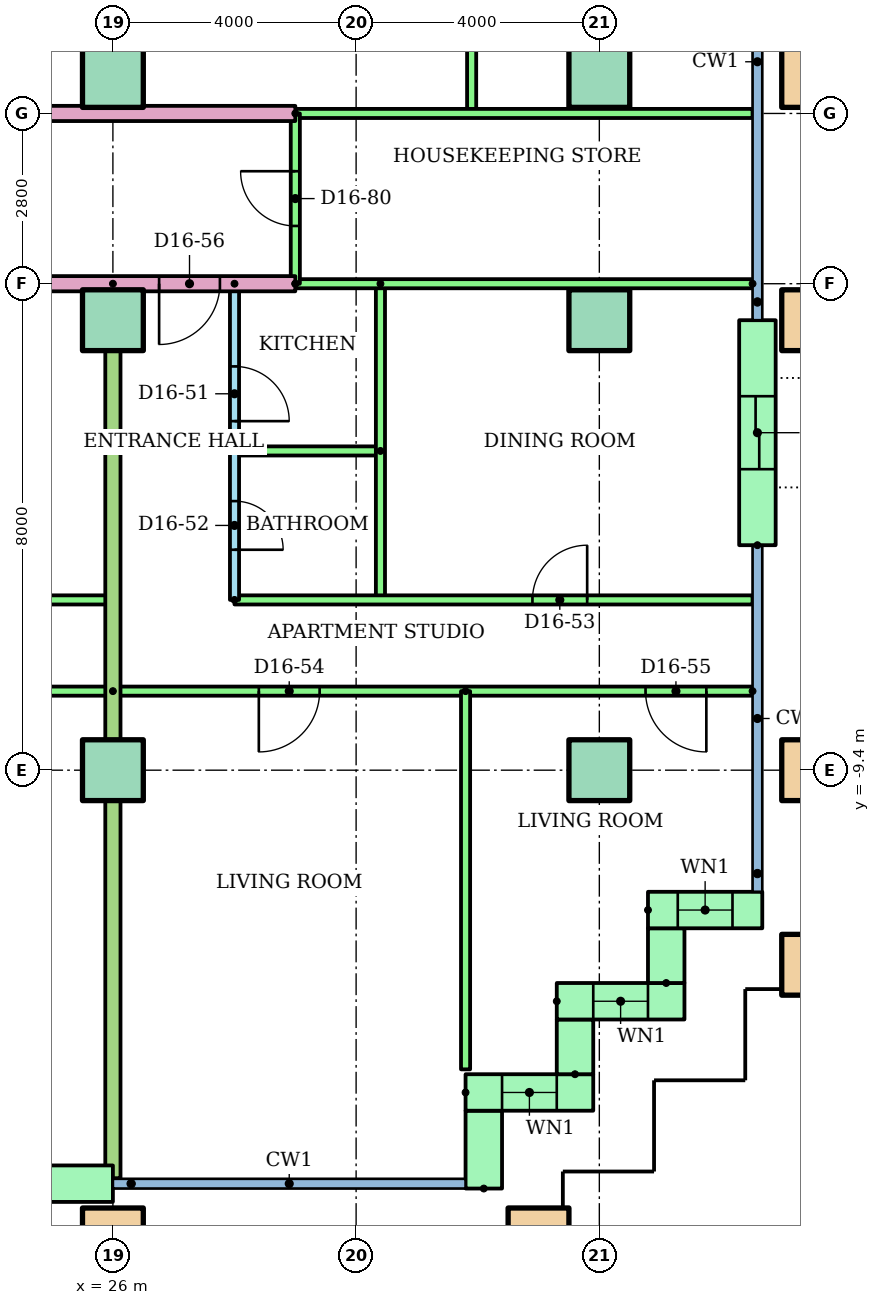
"""IFC4 building model, lengths in metres.
Left out: names, types, materials, properties, quantities, classifications, styles, units other than length and angle.
Written with IfcOpenShell. Run it as: python <this file> out.ifc"""

import sys

from ifc_helpers import new_model, si_unit, direction, frame, frame_2d, origin, origin_2d, place, context, subcontext, project, spatial, rectangle, hollow_rectangle, extrude, element, fill, save


model = new_model("IFC4")
c1 = context("Model", 3, precision=1e-05, world=origin(), true_north=direction((0.0, 1.0)))
c2 = subcontext(c1, "Body", "Model", "MODEL_VIEW")
j1 = project(units=[si_unit("LENGTHUNIT", "METRE"), si_unit("PLANEANGLEUNIT", "RADIAN")], contexts=[c1])
p1 = place(None, origin())
s1 = spatial("IfcSite", under=j1, at=p1, CompositionType="ELEMENT")
p2 = place(p1, origin())
s2 = spatial("IfcBuilding", under=s1, at=p2, CompositionType="ELEMENT")
p3 = place(p2, frame((0.0, 0.0, 60.8)))
s3 = spatial("IfcBuildingStorey", under=s2, at=p3, CompositionType="ELEMENT", Elevation=60.8)
for number, where in (
    (1, (26.0, -17.1, 0.0)),
    (2, (33.0, -17.1, 0.0)),
    (3, (37.5, -12.6, 0.0)),
):
    element("IfcColumn", number, at=place(p3, frame(where)), inside=s3, PredefinedType="COLUMN", context=c2, shape_type="SweptSolid", body=[
        extrude(hollow_rectangle(XDim=1.0, YDim=1.0, WallThickness=0.05, at=origin_2d()), origin(), (0.0, 0.0, 1.0), 3.2),
    ])
for number, where in (
    (4, (26.0, -9.4, 0.0)),
    (5, (34.0, -9.4, 0.0)),
):
    element("IfcColumn", number, at=place(p3, frame(where)), inside=s3, PredefinedType="COLUMN", context=c2, shape_type="SweptSolid", body=[
        extrude(rectangle(XDim=1.0, YDim=1.0, at=origin_2d()), origin(), (0.0, 0.0, 1.0), 3.2),
    ])
p4 = place(p3, frame((37.5, -9.4, 0.0)))
e6 = element("IfcColumn", 6, at=p4, inside=s3, PredefinedType="COLUMN", context=c2, shape_type="SweptSolid", body=[
    extrude(hollow_rectangle(XDim=1.0, YDim=1.0, WallThickness=0.05, at=origin_2d()), origin(), (0.0, 0.0, 1.0), 3.2),
])
for number, where in (
    (7, (26.0, -2.0, 0.0)),
    (8, (34.0, -2.0, 0.0)),
):
    element("IfcColumn", number, at=place(p3, frame(where)), inside=s3, PredefinedType="COLUMN", context=c2, shape_type="SweptSolid", body=[
        extrude(rectangle(XDim=1.0, YDim=1.0, at=origin_2d()), origin(), (0.0, 0.0, 1.0), 3.2),
    ])
p5 = place(p3, frame((37.5, -2.0, 0.0)))
e9 = element("IfcColumn", 9, at=p5, inside=s3, PredefinedType="COLUMN", context=c2, shape_type="SweptSolid", body=[
    extrude(hollow_rectangle(XDim=1.0, YDim=1.0, WallThickness=0.05, at=origin_2d()), origin(), (0.0, 0.0, 1.0), 3.2),
])
for number, where in (
    (10, (26.0, 2.0, 0.0)),
    (11, (34.0, 2.0, 0.0)),
):
    element("IfcColumn", number, at=place(p3, frame(where)), inside=s3, PredefinedType="COLUMN", context=c2, shape_type="SweptSolid", body=[
        extrude(rectangle(XDim=1.0, YDim=1.0, at=origin_2d()), origin(), (0.0, 0.0, 1.0), 3.2),
    ])
p6 = place(p3, frame((37.5, 2.0, 0.0)))
e12 = element("IfcColumn", 12, at=p6, inside=s3, PredefinedType="COLUMN", context=c2, shape_type="SweptSolid", body=[
    extrude(hollow_rectangle(XDim=1.0, YDim=1.0, WallThickness=0.05, at=origin_2d()), origin(), (0.0, 0.0, 1.0), 3.2),
])
p7 = place(p3, frame((22.0, -16.2, 0.0)))
e13 = element("IfcWall", 13, at=p7, inside=s3, PredefinedType="STANDARD", context=c2, shape_type="SweptSolid", body=[
    extrude(rectangle(XDim=4.0, YDim=0.6, at=frame_2d((2.0, 0.0))), origin(), (0.0, 0.0, 1.0), 2.8),
])
p8 = place(p7, frame((1.4, 0.0, 0.0)))
e14 = element("IfcOpeningElement", 14, at=p8, cuts=e13, PredefinedType="OPENING", context=c2, shape_type="SweptSolid", body=[
    extrude(rectangle(XDim=1.2, YDim=2.1, at=frame_2d((0.6, 1.05))), frame((0.0, 0.31, 0.0), z_axis=(0.0, -1.0, 0.0), x_axis=(1.0, 0.0, 0.0)), (0.0, 0.0, 1.0), 0.62),
])
p9 = place(p3, frame((32.1, -16.28, 0.0), z_axis=(0.0, 0.0, 1.0), x_axis=(0.0, 1.0, 0.0)))
e15 = element("IfcWall", 15, at=p9, inside=s3, PredefinedType="STANDARD", context=c2, shape_type="SweptSolid", body=[
    extrude(rectangle(XDim=1.28, YDim=0.6, at=frame_2d((0.64, 0.0))), origin(), (0.0, 0.0, 1.0), 2.8),
])
p10 = place(p3, frame((31.8, -14.7, 0.0)))
e16 = element("IfcWall", 16, at=p10, inside=s3, PredefinedType="STANDARD", context=c2, shape_type="SweptSolid", body=[
    extrude(rectangle(XDim=2.1, YDim=0.6, at=frame_2d((1.05, 0.0))), origin(), (0.0, 0.0, 1.0), 2.8),
])
p11 = place(p10, frame((0.6, 0.0, 0.9)))
e17 = element("IfcOpeningElement", 17, at=p11, cuts=e16, PredefinedType="OPENING", context=c2, shape_type="SweptSolid", body=[
    extrude(rectangle(XDim=0.9, YDim=1.5, at=frame_2d((0.45, 0.75))), frame((0.0, 0.31, 0.0), z_axis=(0.0, -1.0, 0.0), x_axis=(1.0, 0.0, 0.0)), (0.0, 0.0, 1.0), 0.62),
])
p12 = place(p3, frame((33.6, -14.4, 0.0), z_axis=(0.0, 0.0, 1.0), x_axis=(0.0, 1.0, 0.0)))
e18 = element("IfcWall", 18, at=p12, inside=s3, PredefinedType="STANDARD", context=c2, shape_type="SweptSolid", body=[
    extrude(rectangle(XDim=0.9, YDim=0.6, at=frame_2d((0.45, 0.0))), origin(), (0.0, 0.0, 1.0), 2.8),
])
p13 = place(p3, frame((33.3, -13.2, 0.0)))
e19 = element("IfcWall", 19, at=p13, inside=s3, PredefinedType="STANDARD", context=c2, shape_type="SweptSolid", body=[
    extrude(rectangle(XDim=2.1, YDim=0.6, at=frame_2d((1.05, 0.0))), origin(), (0.0, 0.0, 1.0), 2.8),
])
p14 = place(p13, frame((0.6, 0.0, 0.9)))
e20 = element("IfcOpeningElement", 20, at=p14, cuts=e19, PredefinedType="OPENING", context=c2, shape_type="SweptSolid", body=[
    extrude(rectangle(XDim=0.9, YDim=1.5, at=frame_2d((0.45, 0.75))), frame((0.0, 0.31, 0.0), z_axis=(0.0, -1.0, 0.0), x_axis=(1.0, 0.0, 0.0)), (0.0, 0.0, 1.0), 0.62),
])
p15 = place(p3, frame((35.1, -12.9, 0.0), z_axis=(0.0, 0.0, 1.0), x_axis=(0.0, 1.0, 0.0)))
e21 = element("IfcWall", 21, at=p15, inside=s3, PredefinedType="STANDARD", context=c2, shape_type="SweptSolid", body=[
    extrude(rectangle(XDim=0.9, YDim=0.6, at=frame_2d((0.45, 0.0))), origin(), (0.0, 0.0, 1.0), 2.8),
])
p16 = place(p3, frame((34.8, -11.7, 0.0)))
e22 = element("IfcWall", 22, at=p16, inside=s3, PredefinedType="STANDARD", context=c2, shape_type="SweptSolid", body=[
    extrude(rectangle(XDim=1.88, YDim=0.6, at=frame_2d((0.94, 0.0))), origin(), (0.0, 0.0, 1.0), 2.8),
])
p17 = place(p16, frame((0.49, 0.0, 0.9)))
e23 = element("IfcOpeningElement", 23, at=p17, cuts=e22, PredefinedType="OPENING", context=c2, shape_type="SweptSolid", body=[
    extrude(rectangle(XDim=0.9, YDim=1.5, at=frame_2d((0.45, 0.75))), frame((0.0, 0.31, 0.0), z_axis=(0.0, -1.0, 0.0), x_axis=(1.0, 0.0, 0.0)), (0.0, 0.0, 1.0), 0.62),
])
p18 = place(p3, frame((36.6, -5.7, 0.0), z_axis=(0.0, 0.0, 1.0), x_axis=(0.0, 1.0, 0.0)))
e24 = element("IfcWall", 24, at=p18, inside=s3, PredefinedType="STANDARD", context=c2, shape_type="SweptSolid", body=[
    extrude(rectangle(XDim=3.7, YDim=0.6, at=frame_2d((1.85, 0.0))), origin(), (0.0, 0.0, 1.0), 2.8),
])
p19 = place(p18, frame((1.25, 0.0, 0.0)))
e25 = element("IfcOpeningElement", 25, at=p19, cuts=e24, PredefinedType="OPENING", context=c2, shape_type="SweptSolid", body=[
    extrude(rectangle(XDim=1.2, YDim=2.1, at=frame_2d((0.6, 1.05))), frame((0.0, 0.31, 0.0), z_axis=(0.0, -1.0, 0.0), x_axis=(1.0, 0.0, 0.0)), (0.0, 0.0, 1.0), 0.62),
])
p20 = place(p3, frame((12.0, -6.6, 0.0)))
e26 = element("IfcWall", 26, at=p20, inside=s3, PredefinedType="PARTITIONING", context=c2, shape_type="SweptSolid", body=[
    extrude(rectangle(XDim=14.0, YDim=0.15, at=frame_2d((7.0, 0.0))), origin(), (0.0, 0.0, 1.0), 2.4),
])
p21 = place(p20, frame((3.45, 0.0, 0.0)))
e27 = element("IfcOpeningElement", 27, at=p21, cuts=e26, PredefinedType="OPENING", context=c2, shape_type="SweptSolid", body=[
    extrude(rectangle(XDim=0.9, YDim=2.1, at=frame_2d((0.45, 1.05))), frame((0.0, 0.085, 0.0), z_axis=(0.0, -1.0, 0.0), x_axis=(1.0, 0.0, 0.0)), (0.0, 0.0, 1.0), 0.17),
])
p22 = place(p20, frame((6.825, 0.0, 0.0)))
e28 = element("IfcOpeningElement", 28, at=p22, cuts=e26, PredefinedType="OPENING", context=c2, shape_type="SweptSolid", body=[
    extrude(rectangle(XDim=0.9, YDim=2.1, at=frame_2d((0.45, 1.05))), frame((0.0, 0.085, 0.0), z_axis=(0.0, -1.0, 0.0), x_axis=(1.0, 0.0, 0.0)), (0.0, 0.0, 1.0), 0.17),
])
p23 = place(p20, frame((11.125, 0.0, 0.0)))
e29 = element("IfcOpeningElement", 29, at=p23, cuts=e26, PredefinedType="OPENING", context=c2, shape_type="SweptSolid", body=[
    extrude(rectangle(XDim=0.9, YDim=2.1, at=frame_2d((0.45, 1.05))), frame((0.0, 0.085, 0.0), z_axis=(0.0, -1.0, 0.0), x_axis=(1.0, 0.0, 0.0)), (0.0, 0.0, 1.0), 0.17),
])
p24 = place(p3, frame((26.0, -8.1, 0.0), z_axis=(0.0, 0.0, 1.0), x_axis=(-1.0, 0.0, 0.0)))
e30 = element("IfcWall", 30, at=p24, inside=s3, PredefinedType="PARTITIONING", context=c2, shape_type="SweptSolid", body=[
    extrude(rectangle(XDim=16.0, YDim=0.15, at=frame_2d((8.0, 0.0))), origin(), (0.0, 0.0, 1.0), 2.4),
])
p25 = place(p24, frame((13.55, 0.0, 0.0)))
e31 = element("IfcOpeningElement", 31, at=p25, cuts=e30, PredefinedType="OPENING", context=c2, shape_type="SweptSolid", body=[
    extrude(rectangle(XDim=0.9, YDim=2.1, at=frame_2d((0.45, 1.05))), frame((0.0, 0.085, 0.0), z_axis=(0.0, -1.0, 0.0), x_axis=(1.0, 0.0, 0.0)), (0.0, 0.0, 1.0), 0.17),
])
p26 = place(p24, frame((9.55, 0.0, 0.0)))
e32 = element("IfcOpeningElement", 32, at=p26, cuts=e30, PredefinedType="OPENING", context=c2, shape_type="SweptSolid", body=[
    extrude(rectangle(XDim=0.9, YDim=2.1, at=frame_2d((0.45, 1.05))), frame((0.0, 0.085, 0.0), z_axis=(0.0, -1.0, 0.0), x_axis=(1.0, 0.0, 0.0)), (0.0, 0.0, 1.0), 0.17),
])
p27 = place(p24, frame((3.5, 0.0, 0.0)))
e33 = element("IfcOpeningElement", 33, at=p27, cuts=e30, PredefinedType="OPENING", context=c2, shape_type="SweptSolid", body=[
    extrude(rectangle(XDim=1.0, YDim=2.1, at=frame_2d((0.5, 1.05))), frame((0.0, 0.085, 0.0), z_axis=(0.0, -1.0, 0.0), x_axis=(1.0, 0.0, 0.0)), (0.0, 0.0, 1.0), 0.17),
])
p28 = place(p3, frame((28.0, -1.4, 0.0), z_axis=(0.0, 0.0, 1.0), x_axis=(0.0, -1.0, 0.0)))
e34 = element("IfcWall", 34, at=p28, inside=s3, PredefinedType="PARTITIONING", context=c2, shape_type="SweptSolid", body=[
    extrude(rectangle(XDim=5.2, YDim=0.15, at=frame_2d((2.6, 0.0))), origin(), (0.0, 0.0, 1.0), 2.4),
])
p29 = place(p28, frame((1.36, 0.0, 0.0)))
e35 = element("IfcOpeningElement", 35, at=p29, cuts=e34, PredefinedType="OPENING", context=c2, shape_type="SweptSolid", body=[
    extrude(rectangle(XDim=0.9, YDim=2.1, at=frame_2d((0.45, 1.05))), frame((0.0, 0.085, 0.0), z_axis=(0.0, -1.0, 0.0), x_axis=(1.0, 0.0, 0.0)), (0.0, 0.0, 1.0), 0.17),
])
p30 = place(p28, frame((3.575, 0.0, 0.0)))
e36 = element("IfcOpeningElement", 36, at=p30, cuts=e34, PredefinedType="OPENING", context=c2, shape_type="SweptSolid", body=[
    extrude(rectangle(XDim=0.8, YDim=2.1, at=frame_2d((0.4, 1.05))), frame((0.0, 0.085, 0.0), z_axis=(0.0, -1.0, 0.0), x_axis=(1.0, 0.0, 0.0)), (0.0, 0.0, 1.0), 0.17),
])
p31 = place(p3, frame((30.4, -4.15, 0.0), z_axis=(0.0, 0.0, 1.0), x_axis=(-1.0, 0.0, 0.0)))
e37 = element("IfcWall", 37, at=p31, inside=s3, PredefinedType="PARTITIONING", context=c2, shape_type="SweptSolid", body=[
    extrude(rectangle(XDim=2.4, YDim=0.15, at=frame_2d((1.2, 0.0))), origin(), (0.0, 0.0, 1.0), 2.4),
])
p32 = place(p3, frame((30.4, -1.4, 0.0), z_axis=(0.0, 0.0, 1.0), x_axis=(0.0, -1.0, 0.0)))
e38 = element("IfcWall", 38, at=p32, inside=s3, PredefinedType="PARTITIONING", context=c2, shape_type="SweptSolid", body=[
    extrude(rectangle(XDim=5.2, YDim=0.15, at=frame_2d((2.6, 0.0))), origin(), (0.0, 0.0, 1.0), 2.4),
])
p33 = place(p3, frame((28.0, -6.6, 0.0)))
e39 = element("IfcWall", 39, at=p33, inside=s3, PredefinedType="PARTITIONING", context=c2, shape_type="SweptSolid", body=[
    extrude(rectangle(XDim=8.52, YDim=0.15, at=frame_2d((4.26, 0.0))), origin(), (0.0, 0.0, 1.0), 2.4),
])
p34 = place(p33, frame((4.9, 0.0, 0.0)))
e40 = element("IfcOpeningElement", 40, at=p34, cuts=e39, PredefinedType="OPENING", context=c2, shape_type="SweptSolid", body=[
    extrude(rectangle(XDim=0.9, YDim=2.1, at=frame_2d((0.45, 1.05))), frame((0.0, 0.085, 0.0), z_axis=(0.0, -1.0, 0.0), x_axis=(1.0, 0.0, 0.0)), (0.0, 0.0, 1.0), 0.17),
])
p35 = place(p3, frame((36.52, -8.1, 0.0), z_axis=(0.0, 0.0, 1.0), x_axis=(-1.0, 0.0, 0.0)))
e41 = element("IfcWall", 41, at=p35, inside=s3, PredefinedType="PARTITIONING", context=c2, shape_type="SweptSolid", body=[
    extrude(rectangle(XDim=10.52, YDim=0.15, at=frame_2d((5.26, 0.0))), origin(), (0.0, 0.0, 1.0), 2.4),
])
p36 = place(p35, frame((7.12, 0.0, 0.0)))
e42 = element("IfcOpeningElement", 42, at=p36, cuts=e41, PredefinedType="OPENING", context=c2, shape_type="SweptSolid", body=[
    extrude(rectangle(XDim=1.0, YDim=2.1, at=frame_2d((0.5, 1.05))), frame((0.0, 0.085, 0.0), z_axis=(0.0, -1.0, 0.0), x_axis=(1.0, 0.0, 0.0)), (0.0, 0.0, 1.0), 0.17),
])
p37 = place(p35, frame((0.76, 0.0, 0.0)))
e43 = element("IfcOpeningElement", 43, at=p37, cuts=e41, PredefinedType="OPENING", context=c2, shape_type="SweptSolid", body=[
    extrude(rectangle(XDim=1.0, YDim=2.1, at=frame_2d((0.5, 1.05))), frame((0.0, 0.085, 0.0), z_axis=(0.0, -1.0, 0.0), x_axis=(1.0, 0.0, 0.0)), (0.0, 0.0, 1.0), 0.17),
])
p38 = place(p3, frame((31.8, -8.1, 0.0), z_axis=(0.0, 0.0, 1.0), x_axis=(0.0, -1.0, 0.0)))
e44 = element("IfcWall", 44, at=p38, inside=s3, PredefinedType="PARTITIONING", context=c2, shape_type="SweptSolid", body=[
    extrude(rectangle(XDim=6.22, YDim=0.15, at=frame_2d((3.11, 0.0))), origin(), (0.0, 0.0, 1.0), 2.4),
])
p39 = place(p3, frame((26.0, -1.4, 0.0), z_axis=(0.0, 0.0, 1.0), x_axis=(0.0, -1.0, 0.0)))
e45 = element("IfcWall", 45, at=p39, inside=s3, PredefinedType="PARTITIONING", context=c2, shape_type="SweptSolid", body=[
    extrude(rectangle(XDim=14.71, YDim=0.25, at=frame_2d((7.355, 0.0))), origin(), (0.0, 0.0, 1.0), 2.4),
])
p40 = place(p3, frame((29.0, -1.4, 0.0), z_axis=(0.0, 0.0, 1.0), x_axis=(-1.0, 0.0, 0.0)))
e46 = element("IfcWall", 46, at=p40, inside=s3, PredefinedType="PARTITIONING", context=c2, shape_type="SweptSolid", body=[
    extrude(rectangle(XDim=15.0, YDim=0.25, at=frame_2d((7.5, 0.0))), origin(), (0.0, 0.0, 1.0), 2.4),
])
p41 = place(p40, frame((1.24, 0.0, 0.0)))
e47 = element("IfcOpeningElement", 47, at=p41, cuts=e46, PredefinedType="OPENING", context=c2, shape_type="SweptSolid", body=[
    extrude(rectangle(XDim=1.0, YDim=2.1, at=frame_2d((0.5, 1.05))), frame((0.0, 0.135, 0.0), z_axis=(0.0, -1.0, 0.0), x_axis=(1.0, 0.0, 0.0)), (0.0, 0.0, 1.0), 0.27),
])
p42 = place(p3, frame((36.52, -1.4, 0.0), z_axis=(0.0, 0.0, 1.0), x_axis=(-1.0, 0.0, 0.0)))
e48 = element("IfcWall", 48, at=p42, inside=s3, PredefinedType="PARTITIONING", context=c2, shape_type="SweptSolid", body=[
    extrude(rectangle(XDim=7.52, YDim=0.15, at=frame_2d((3.76, 0.0))), origin(), (0.0, 0.0, 1.0), 2.4),
])
for number, where, z_axis, x_axis in (
    (49, (25.9, 9.0, 0.0), (0.0, 0.0, 1.0), (0.0, -1.0, 0.0)),
    (50, (31.9, 9.0, 0.0), (0.0, 0.0, 1.0), (0.0, -1.0, 0.0)),
):
    element("IfcWall", number, at=place(p3, frame(where, z_axis=z_axis, x_axis=x_axis)), inside=s3, PredefinedType="PARTITIONING", context=c2, shape_type="SweptSolid", body=[
        extrude(rectangle(XDim=7.6, YDim=0.15, at=frame_2d((3.8, 0.0))), origin(), (0.0, 0.0, 1.0), 2.4),
    ])
p43 = place(p3, frame((14.0, 1.4, 0.0)))
e51 = element("IfcWall", 51, at=p43, inside=s3, PredefinedType="PARTITIONING", context=c2, shape_type="SweptSolid", body=[
    extrude(rectangle(XDim=15.0, YDim=0.25, at=frame_2d((7.5, 0.0))), origin(), (0.0, 0.0, 1.0), 2.4),
])
p44 = place(p43, frame((0.5, 0.0, 0.0)))
e52 = element("IfcOpeningElement", 52, at=p44, cuts=e51, PredefinedType="OPENING", context=c2, shape_type="SweptSolid", body=[
    extrude(rectangle(XDim=1.0, YDim=2.1, at=frame_2d((0.5, 1.05))), frame((0.0, 0.135, 0.0), z_axis=(0.0, -1.0, 0.0), x_axis=(1.0, 0.0, 0.0)), (0.0, 0.0, 1.0), 0.27),
])
p45 = place(p3, frame((29.0, 1.4, 0.0)))
e53 = element("IfcWall", 53, at=p45, inside=s3, PredefinedType="PARTITIONING", context=c2, shape_type="SweptSolid", body=[
    extrude(rectangle(XDim=7.52, YDim=0.15, at=frame_2d((3.76, 0.0))), origin(), (0.0, 0.0, 1.0), 2.4),
])
p46 = place(p3, frame((29.0, -1.4, 0.0), z_axis=(0.0, 0.0, 1.0), x_axis=(0.0, 1.0, 0.0)))
e54 = element("IfcWall", 54, at=p46, inside=s3, PredefinedType="PARTITIONING", context=c2, shape_type="SweptSolid", body=[
    extrude(rectangle(XDim=2.8, YDim=0.15, at=frame_2d((1.4, 0.0))), origin(), (0.0, 0.0, 1.0), 2.4),
])
p47 = place(p46, frame((0.95, 0.0, 0.0)))
e55 = element("IfcOpeningElement", 55, at=p47, cuts=e54, PredefinedType="OPENING", context=c2, shape_type="SweptSolid", body=[
    extrude(rectangle(XDim=0.9, YDim=2.1, at=frame_2d((0.45, 1.05))), frame((0.0, 0.085, 0.0), z_axis=(0.0, -1.0, 0.0), x_axis=(1.0, 0.0, 0.0)), (0.0, 0.0, 1.0), 0.17),
])
p48 = place(p11, origin())
e56 = element("IfcWindow", 56, at=p48, inside=s3, PartitioningType="SINGLE_PANEL", PredefinedType="WINDOW", context=c2, shape_type="SweptSolid", body=[
    extrude(rectangle(XDim=0.9, YDim=1.5, at=frame_2d((0.45, 0.75))), frame((0.0, 0.03, 0.0), z_axis=(0.0, -1.0, 0.0), x_axis=(1.0, 0.0, 0.0)), (0.0, 0.0, 1.0), 0.06),
])
fill(e17, e56)
p49 = place(p14, origin())
e57 = element("IfcWindow", 57, at=p49, inside=s3, PartitioningType="SINGLE_PANEL", PredefinedType="WINDOW", context=c2, shape_type="SweptSolid", body=[
    extrude(rectangle(XDim=0.9, YDim=1.5, at=frame_2d((0.45, 0.75))), frame((0.0, 0.03, 0.0), z_axis=(0.0, -1.0, 0.0), x_axis=(1.0, 0.0, 0.0)), (0.0, 0.0, 1.0), 0.06),
])
fill(e20, e57)
p50 = place(p17, origin())
e58 = element("IfcWindow", 58, at=p50, inside=s3, PartitioningType="SINGLE_PANEL", PredefinedType="WINDOW", context=c2, shape_type="SweptSolid", body=[
    extrude(rectangle(XDim=0.9, YDim=1.5, at=frame_2d((0.45, 0.75))), frame((0.0, 0.03, 0.0), z_axis=(0.0, -1.0, 0.0), x_axis=(1.0, 0.0, 0.0)), (0.0, 0.0, 1.0), 0.06),
])
fill(e23, e58)
p51 = place(p29, origin())
e59 = element("IfcDoor", 59, at=p51, inside=s3, OperationType="SINGLE_SWING_RIGHT", PredefinedType="DOOR", context=c2, shape_type="SweptSolid", body=[
    extrude(rectangle(XDim=0.9, YDim=2.1, at=frame_2d((0.45, 1.05))), frame((0.0, 0.025, 0.0), z_axis=(0.0, -1.0, 0.0), x_axis=(1.0, 0.0, 0.0)), (0.0, 0.0, 1.0), 0.05),
])
fill(e35, e59)
p52 = place(p30, origin())
e60 = element("IfcDoor", 60, at=p52, inside=s3, OperationType="SINGLE_SWING_RIGHT", PredefinedType="DOOR", context=c2, shape_type="SweptSolid", body=[
    extrude(rectangle(XDim=0.8, YDim=2.1, at=frame_2d((0.4, 1.05))), frame((0.0, 0.025, 0.0), z_axis=(0.0, -1.0, 0.0), x_axis=(1.0, 0.0, 0.0)), (0.0, 0.0, 1.0), 0.05),
])
fill(e36, e60)
p53 = place(p34, origin())
e61 = element("IfcDoor", 61, at=p53, inside=s3, OperationType="SINGLE_SWING_RIGHT", PredefinedType="DOOR", context=c2, shape_type="SweptSolid", body=[
    extrude(rectangle(XDim=0.9, YDim=2.1, at=frame_2d((0.45, 1.05))), frame((0.0, 0.025, 0.0), z_axis=(0.0, -1.0, 0.0), x_axis=(1.0, 0.0, 0.0)), (0.0, 0.0, 1.0), 0.05),
])
fill(e40, e61)
p54 = place(p36, origin())
e62 = element("IfcDoor", 62, at=p54, inside=s3, OperationType="SINGLE_SWING_RIGHT", PredefinedType="DOOR", context=c2, shape_type="SweptSolid", body=[
    extrude(rectangle(XDim=1.0, YDim=2.1, at=frame_2d((0.5, 1.05))), frame((0.0, 0.025, 0.0), z_axis=(0.0, -1.0, 0.0), x_axis=(1.0, 0.0, 0.0)), (0.0, 0.0, 1.0), 0.05),
])
fill(e42, e62)
p55 = place(p37, origin())
e63 = element("IfcDoor", 63, at=p55, inside=s3, OperationType="SINGLE_SWING_LEFT", PredefinedType="DOOR", context=c2, shape_type="SweptSolid", body=[
    extrude(rectangle(XDim=1.0, YDim=2.1, at=frame_2d((0.5, 1.05))), frame((0.0, 0.025, 0.0), z_axis=(0.0, -1.0, 0.0), x_axis=(1.0, 0.0, 0.0)), (0.0, 0.0, 1.0), 0.05),
])
fill(e43, e63)
p56 = place(p41, origin())
e64 = element("IfcDoor", 64, at=p56, inside=s3, OperationType="SINGLE_SWING_RIGHT", PredefinedType="DOOR", context=c2, shape_type="SweptSolid", body=[
    extrude(rectangle(XDim=1.0, YDim=2.1, at=frame_2d((0.5, 1.05))), frame((0.0, 0.025, 0.0), z_axis=(0.0, -1.0, 0.0), x_axis=(1.0, 0.0, 0.0)), (0.0, 0.0, 1.0), 0.05),
])
fill(e47, e64)
p57 = place(p47, origin())
e65 = element("IfcDoor", 65, at=p57, inside=s3, OperationType="SINGLE_SWING_RIGHT", PredefinedType="DOOR", context=c2, shape_type="SweptSolid", body=[
    extrude(rectangle(XDim=0.9, YDim=2.1, at=frame_2d((0.45, 1.05))), frame((0.0, 0.025, 0.0), z_axis=(0.0, -1.0, 0.0), x_axis=(1.0, 0.0, 0.0)), (0.0, 0.0, 1.0), 0.05),
])
fill(e55, e65)
p58 = place(p19, origin())
e66 = element("IfcDoor", 66, at=p58, inside=s3, OperationType="SLIDING_TO_LEFT", PredefinedType="DOOR", context=c2, shape_type="SweptSolid", body=[
    extrude(rectangle(XDim=1.2, YDim=2.1, at=frame_2d((0.6, 1.05))), frame((0.0, 0.025, 0.0), z_axis=(0.0, -1.0, 0.0), x_axis=(1.0, 0.0, 0.0)), (0.0, 0.0, 1.0), 0.05),
])
fill(e25, e66)
save(model, sys.argv[1])
